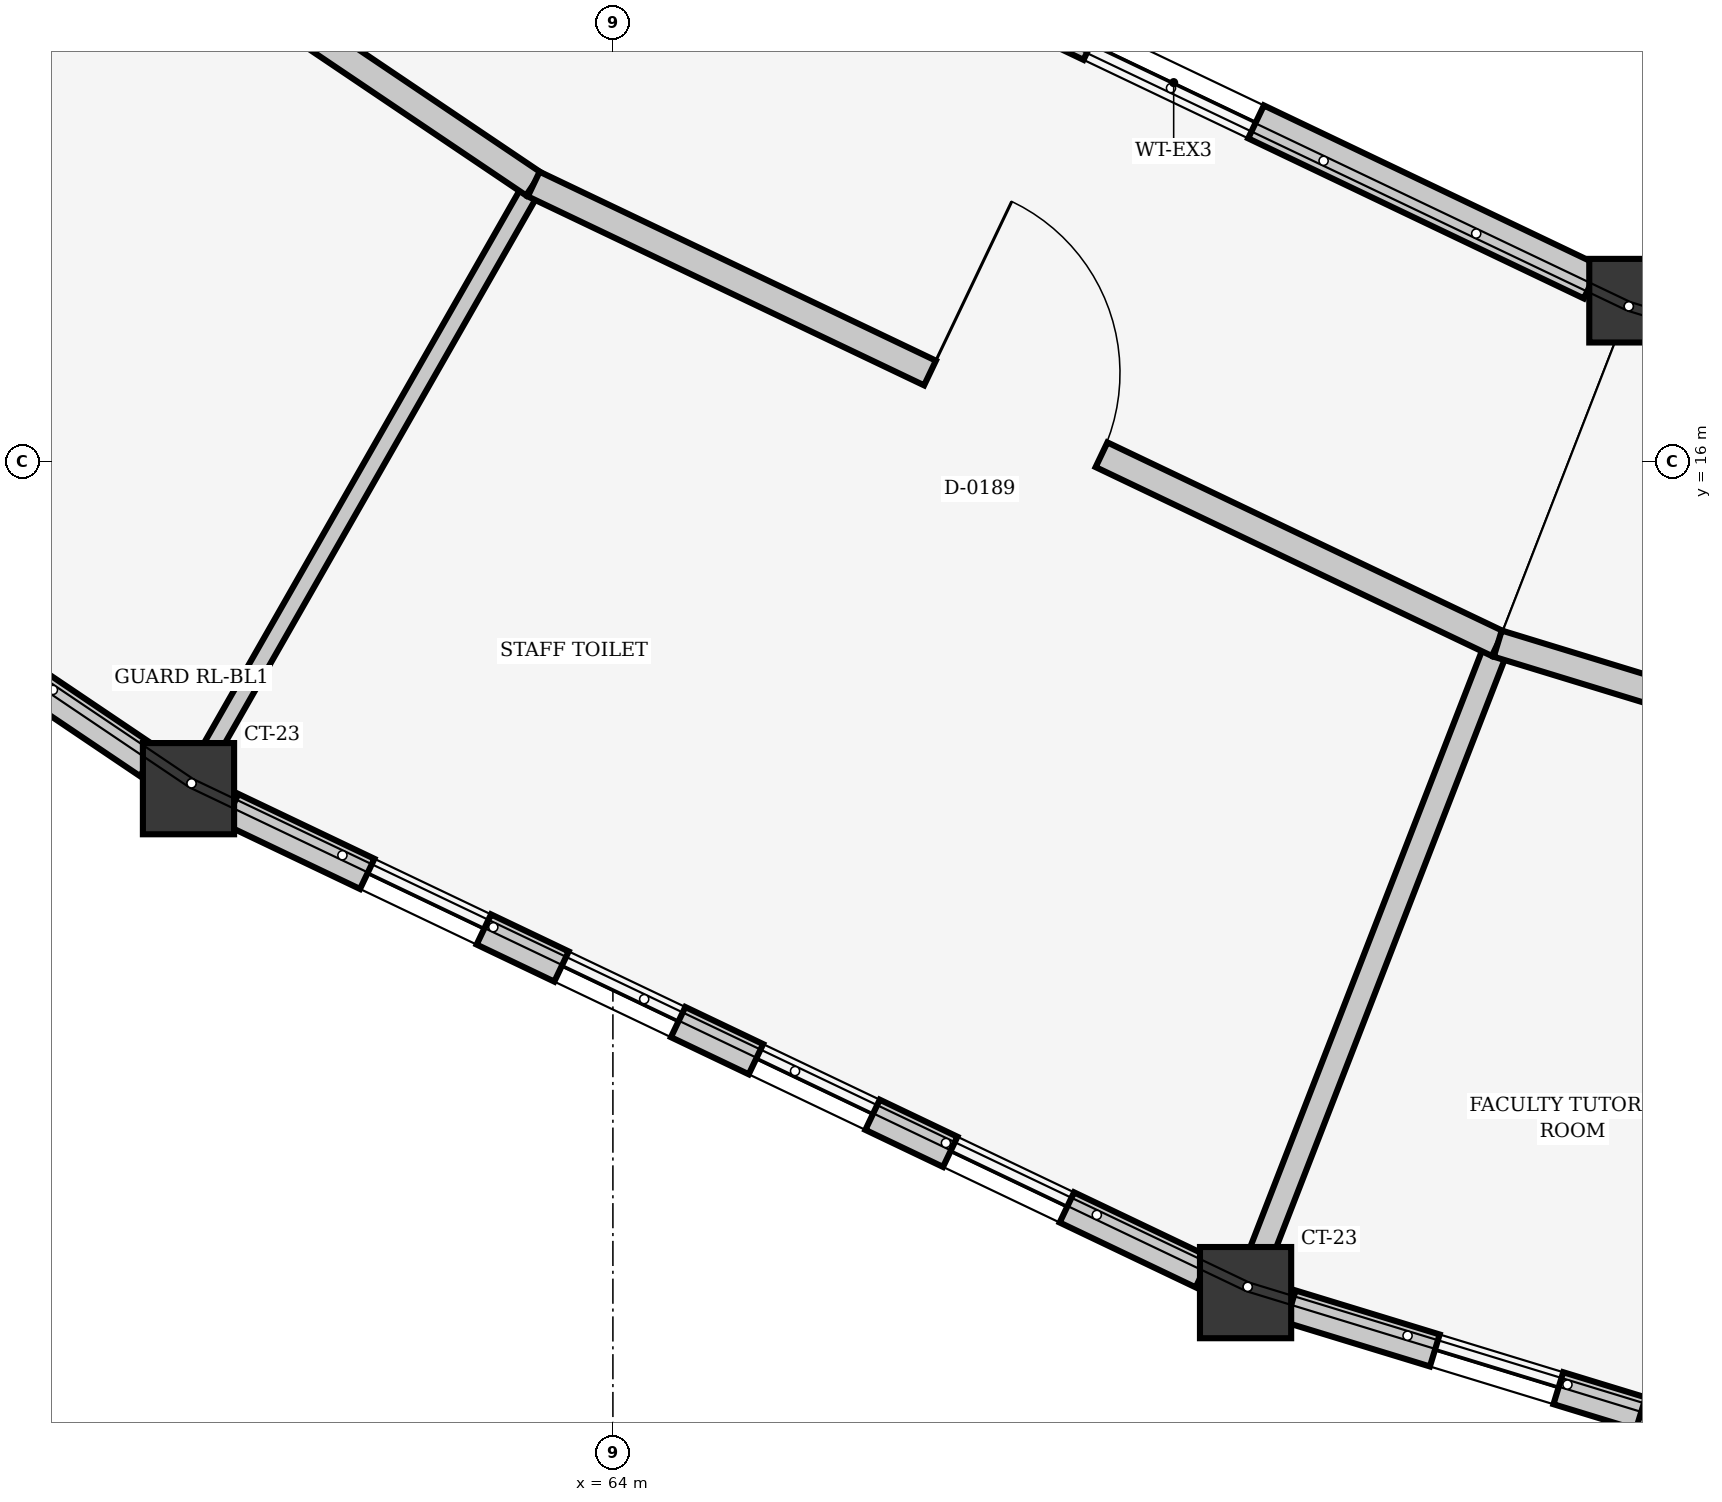
"""IFC4 building model, lengths in metres.
Left out: names, types, materials, properties, quantities, classifications, styles, units other than length and angle.
Written with IfcOpenShell. Run it as: python <this file> out.ifc"""

import sys

from ifc_helpers import new_model, si_unit, direction, frame, frame_2d, origin, origin_2d, place, context, subcontext, project, spatial, rectangle, extrude, element, fill, save


model = new_model("IFC4")
c1 = context("Model", 3, precision=1e-05, world=origin(), true_north=direction((0.0, 1.0)))
c2 = subcontext(c1, "Body", "Model", "MODEL_VIEW")
j1 = project(units=[si_unit("LENGTHUNIT", "METRE"), si_unit("PLANEANGLEUNIT", "RADIAN")], contexts=[c1])
p1 = place(None, origin())
s1 = spatial("IfcSite", under=j1, at=p1, CompositionType="ELEMENT")
p2 = place(p1, origin())
s2 = spatial("IfcBuilding", under=s1, at=p2, CompositionType="ELEMENT")
p3 = place(p2, frame((0.0, 0.0, 8.5)))
s3 = spatial("IfcBuildingStorey", under=s2, at=p3, CompositionType="ELEMENT", Elevation=8.5)
p4 = place(p3, frame((70.698, 17.057, 0.0), z_axis=(0.0, 0.0, 1.0), x_axis=(-0.362275366705, -0.932071112458, 0.0)))
e1 = element("IfcColumn", 1, at=p4, inside=s3, PredefinedType="COLUMN", context=c2, shape_type="SweptSolid", body=[
    extrude(rectangle(XDim=0.55, YDim=0.55, at=origin_2d()), origin(), (0.0, 0.0, 1.0), 4.0),
])
for number, where, z_axis, x_axis in (
    (2, (61.208, 13.847, 0.0), (0.0, 0.0, 1.0), (-0.496, -0.868, 0.0)),
    (3, (68.162, 10.532, 0.0), (0.0, 0.0, 1.0), (-0.362, -0.932, 0.0)),
):
    element("IfcColumn", number, at=place(p3, frame(where, z_axis=z_axis, x_axis=x_axis)), inside=s3, PredefinedType="COLUMN", context=c2, shape_type="SweptSolid", body=[
        extrude(rectangle(XDim=0.6, YDim=0.6, at=origin_2d()), origin(), (0.0, 0.0, 1.0), 4.0),
    ])
p5 = place(p3, frame((60.95, 14.021, 0.0), z_axis=(0.0, 0.0, 1.0), x_axis=(-0.829217797208, 0.558925616512, 0.0)))
e4 = element("IfcWall", 4, at=p5, inside=s3, PredefinedType="SOLIDWALL", context=c2, shape_type="SweptSolid", body=[
    extrude(rectangle(XDim=7.082, YDim=0.22, at=frame_2d((3.541, 0.0))), origin(), (0.0, 0.0, 1.0), 3.192),
])
p6 = place(p5, frame((0.991, 0.0, 0.85)))
e5 = element("IfcOpeningElement", 5, at=p6, cuts=e4, PredefinedType="OPENING", context=c2, shape_type="SweptSolid", body=[
    extrude(rectangle(XDim=0.85, YDim=1.25, at=frame_2d((0.425, 0.625))), frame((0.0, 0.12, 0.0), z_axis=(0.0, -1.0, 0.0), x_axis=(1.0, 0.0, 0.0)), (0.0, 0.0, 1.0), 0.24),
])
p7 = place(p5, frame((2.408, 0.0, 0.85)))
e6 = element("IfcOpeningElement", 6, at=p7, cuts=e4, PredefinedType="OPENING", context=c2, shape_type="SweptSolid", body=[
    extrude(rectangle(XDim=0.85, YDim=1.25, at=frame_2d((0.425, 0.625))), frame((0.0, 0.12, 0.0), z_axis=(0.0, -1.0, 0.0), x_axis=(1.0, 0.0, 0.0)), (0.0, 0.0, 1.0), 0.24),
])
p8 = place(p5, frame((3.824, 0.0, 0.85)))
e7 = element("IfcOpeningElement", 7, at=p8, cuts=e4, PredefinedType="OPENING", context=c2, shape_type="SweptSolid", body=[
    extrude(rectangle(XDim=0.85, YDim=1.25, at=frame_2d((0.425, 0.625))), frame((0.0, 0.12, 0.0), z_axis=(0.0, -1.0, 0.0), x_axis=(1.0, 0.0, 0.0)), (0.0, 0.0, 1.0), 0.24),
])
p9 = place(p5, frame((5.24, 0.0, 0.85)))
e8 = element("IfcOpeningElement", 8, at=p9, cuts=e4, PredefinedType="OPENING", context=c2, shape_type="SweptSolid", body=[
    extrude(rectangle(XDim=0.85, YDim=1.25, at=frame_2d((0.425, 0.625))), frame((0.0, 0.12, 0.0), z_axis=(0.0, -1.0, 0.0), x_axis=(1.0, 0.0, 0.0)), (0.0, 0.0, 1.0), 0.24),
])
p10 = place(p3, frame((67.881, 10.666, 0.0), z_axis=(0.0, 0.0, 1.0), x_axis=(-0.902694754948, 0.430281511792, 0.0)))
e9 = element("IfcWall", 9, at=p10, inside=s3, PredefinedType="SOLIDWALL", context=c2, shape_type="SweptSolid", body=[
    extrude(rectangle(XDim=7.081, YDim=0.22, at=frame_2d((3.541, 0.0))), origin(), (0.0, 0.0, 1.0), 3.192),
])
p11 = place(p10, frame((0.991, 0.0, 0.85)))
e10 = element("IfcOpeningElement", 10, at=p11, cuts=e9, PredefinedType="OPENING", context=c2, shape_type="SweptSolid", body=[
    extrude(rectangle(XDim=0.85, YDim=1.25, at=frame_2d((0.425, 0.625))), frame((0.0, 0.12, 0.0), z_axis=(0.0, -1.0, 0.0), x_axis=(1.0, 0.0, 0.0)), (0.0, 0.0, 1.0), 0.24),
])
p12 = place(p10, frame((2.407, 0.0, 0.85)))
e11 = element("IfcOpeningElement", 11, at=p12, cuts=e9, PredefinedType="OPENING", context=c2, shape_type="SweptSolid", body=[
    extrude(rectangle(XDim=0.85, YDim=1.25, at=frame_2d((0.425, 0.625))), frame((0.0, 0.12, 0.0), z_axis=(0.0, -1.0, 0.0), x_axis=(1.0, 0.0, 0.0)), (0.0, 0.0, 1.0), 0.24),
])
p13 = place(p10, frame((3.824, 0.0, 0.85)))
e12 = element("IfcOpeningElement", 12, at=p13, cuts=e9, PredefinedType="OPENING", context=c2, shape_type="SweptSolid", body=[
    extrude(rectangle(XDim=0.85, YDim=1.25, at=frame_2d((0.425, 0.625))), frame((0.0, 0.12, 0.0), z_axis=(0.0, -1.0, 0.0), x_axis=(1.0, 0.0, 0.0)), (0.0, 0.0, 1.0), 0.24),
])
p14 = place(p10, frame((5.24, 0.0, 0.85)))
e13 = element("IfcOpeningElement", 13, at=p14, cuts=e9, PredefinedType="OPENING", context=c2, shape_type="SweptSolid", body=[
    extrude(rectangle(XDim=0.85, YDim=1.25, at=frame_2d((0.425, 0.625))), frame((0.0, 0.12, 0.0), z_axis=(0.0, -1.0, 0.0), x_axis=(1.0, 0.0, 0.0)), (0.0, 0.0, 1.0), 0.24),
])
p15 = place(p3, frame((64.939, 19.803, 0.0), z_axis=(0.0, 0.0, 1.0), x_axis=(0.90260559719, -0.430468507467, 0.0)))
e14 = element("IfcWall", 14, at=p15, inside=s3, PredefinedType="SOLIDWALL", context=c2, shape_type="SweptSolid", body=[
    extrude(rectangle(XDim=6.094, YDim=0.24, at=frame_2d((3.047, 0.0))), origin(), (0.0, 0.0, 1.0), 3.05),
])
p16 = place(p15, frame((2.447, 0.0, 2.05)))
e15 = element("IfcOpeningElement", 15, at=p16, cuts=e14, PredefinedType="OPENING", context=c2, shape_type="SweptSolid", body=[
    extrude(rectangle(XDim=1.2, YDim=0.85, at=frame_2d((0.6, 0.425))), frame((0.0, 0.13, 0.0), z_axis=(0.0, -1.0, 0.0), x_axis=(1.0, 0.0, 0.0)), (0.0, 0.0, 1.0), 0.26),
])
p17 = place(p3, frame((75.232, 8.372, 0.0), z_axis=(0.0, 0.0, 1.0), x_axis=(-0.956377793717, 0.292132702183, 0.0)))
e16 = element("IfcWall", 16, at=p17, inside=s3, PredefinedType="SOLIDWALL", context=c2, shape_type="SweptSolid", body=[
    extrude(rectangle(XDim=7.082, YDim=0.22, at=frame_2d((3.541, 0.0))), origin(), (0.0, 0.0, 1.0), 3.192),
])
p18 = place(p17, frame((0.991, 0.0, 0.85)))
e17 = element("IfcOpeningElement", 17, at=p18, cuts=e16, PredefinedType="OPENING", context=c2, shape_type="SweptSolid", body=[
    extrude(rectangle(XDim=0.85, YDim=1.25, at=frame_2d((0.425, 0.625))), frame((0.0, 0.12, 0.0), z_axis=(0.0, -1.0, 0.0), x_axis=(1.0, 0.0, 0.0)), (0.0, 0.0, 1.0), 0.24),
])
p19 = place(p17, frame((2.408, 0.0, 0.85)))
e18 = element("IfcOpeningElement", 18, at=p19, cuts=e16, PredefinedType="OPENING", context=c2, shape_type="SweptSolid", body=[
    extrude(rectangle(XDim=0.85, YDim=1.25, at=frame_2d((0.425, 0.625))), frame((0.0, 0.12, 0.0), z_axis=(0.0, -1.0, 0.0), x_axis=(1.0, 0.0, 0.0)), (0.0, 0.0, 1.0), 0.24),
])
p20 = place(p17, frame((3.824, 0.0, 0.85)))
e19 = element("IfcOpeningElement", 19, at=p20, cuts=e16, PredefinedType="OPENING", context=c2, shape_type="SweptSolid", body=[
    extrude(rectangle(XDim=0.85, YDim=1.25, at=frame_2d((0.425, 0.625))), frame((0.0, 0.12, 0.0), z_axis=(0.0, -1.0, 0.0), x_axis=(1.0, 0.0, 0.0)), (0.0, 0.0, 1.0), 0.24),
])
p21 = place(p17, frame((5.241, 0.0, 0.85)))
e20 = element("IfcOpeningElement", 20, at=p21, cuts=e16, PredefinedType="OPENING", context=c2, shape_type="SweptSolid", body=[
    extrude(rectangle(XDim=0.85, YDim=1.25, at=frame_2d((0.425, 0.625))), frame((0.0, 0.12, 0.0), z_axis=(0.0, -1.0, 0.0), x_axis=(1.0, 0.0, 0.0)), (0.0, 0.0, 1.0), 0.24),
])
p22 = place(p3, frame((63.479, 17.824, 0.0), z_axis=(0.0, 0.0, 1.0), x_axis=(-0.495893608829, -0.868383284456, 0.0)))
e21 = element("IfcWall", 21, at=p22, inside=s3, PredefinedType="PARTITIONING", context=c2, shape_type="SweptSolid", body=[
    extrude(rectangle(XDim=4.287, YDim=0.12, at=frame_2d((2.144, 0.0))), origin(), (0.0, 0.0, 1.0), 3.092),
])
p23 = place(p3, frame((69.821, 14.801, 0.0), z_axis=(0.0, 0.0, 1.0), x_axis=(-0.362155011762, -0.932117882811, 0.0)))
e22 = element("IfcWall", 22, at=p23, inside=s3, PredefinedType="PARTITIONING", context=c2, shape_type="SweptSolid", body=[
    extrude(rectangle(XDim=4.288, YDim=0.16, at=frame_2d((2.144, 0.0))), origin(), (0.0, 0.0, 1.0), 3.092),
])
p24 = place(p3, frame((57.654, 21.751, 0.0), z_axis=(0.0, 0.0, 1.0), x_axis=(0.829168029301, -0.558999444709, 0.0)))
e23 = element("IfcWall", 23, at=p24, inside=s3, PredefinedType="PARTITIONING", context=c2, shape_type="SweptSolid", body=[
    extrude(rectangle(XDim=7.025, YDim=0.18, at=frame_2d((3.513, 0.0))), origin(), (0.0, 0.0, 1.0), 3.092),
])
p25 = place(p24, frame((3.023, 0.0, 0.0)))
e24 = element("IfcOpeningElement", 24, at=p25, cuts=e23, PredefinedType="OPENING", context=c2, shape_type="SweptSolid", body=[
    extrude(rectangle(XDim=0.98, YDim=2.2, at=frame_2d((0.49, 1.1))), frame((0.0, 0.1, 0.0), z_axis=(0.0, -1.0, 0.0), x_axis=(1.0, 0.0, 0.0)), (0.0, 0.0, 1.0), 0.2),
])
p26 = place(p3, frame((63.479, 17.824, 0.0), z_axis=(0.0, 0.0, 1.0), x_axis=(0.90269858831, -0.430273469625, 0.0)))
e25 = element("IfcWall", 25, at=p26, inside=s3, PredefinedType="PARTITIONING", context=c2, shape_type="SweptSolid", body=[
    extrude(rectangle(XDim=7.026, YDim=0.18, at=frame_2d((3.513, 0.0))), origin(), (0.0, 0.0, 1.0), 3.092),
])
p27 = place(p26, frame((2.888, 0.0, 0.0)))
e26 = element("IfcOpeningElement", 26, at=p27, cuts=e25, PredefinedType="OPENING", context=c2, shape_type="SweptSolid", body=[
    extrude(rectangle(XDim=1.25, YDim=2.2, at=frame_2d((0.625, 1.1))), frame((0.0, 0.1, 0.0), z_axis=(0.0, -1.0, 0.0), x_axis=(1.0, 0.0, 0.0)), (0.0, 0.0, 1.0), 0.2),
])
p28 = place(p3, frame((69.821, 14.801, 0.0), z_axis=(0.0, 0.0, 1.0), x_axis=(0.956341588058, -0.292251205218, 0.0)))
e27 = element("IfcWall", 27, at=p28, inside=s3, PredefinedType="PARTITIONING", context=c2, shape_type="SweptSolid", body=[
    extrude(rectangle(XDim=7.025, YDim=0.18, at=frame_2d((3.512, 0.0))), origin(), (0.0, 0.0, 1.0), 3.092),
])
p29 = place(p28, frame((2.737, 0.0, 0.0)))
e28 = element("IfcOpeningElement", 28, at=p29, cuts=e27, PredefinedType="OPENING", context=c2, shape_type="SweptSolid", body=[
    extrude(rectangle(XDim=1.55, YDim=2.2, at=frame_2d((0.775, 1.1))), frame((0.0, 0.1, 0.0), z_axis=(0.0, -1.0, 0.0), x_axis=(1.0, 0.0, 0.0)), (0.0, 0.0, 1.0), 0.2),
])
p30 = place(p11, origin())
e29 = element("IfcWindow", 29, at=p30, inside=s3, PartitioningType="SINGLE_PANEL", PredefinedType="WINDOW", context=c2, shape_type="SweptSolid", body=[
    extrude(rectangle(XDim=0.85, YDim=1.25, at=frame_2d((0.425, 0.625))), frame((0.0, 0.03, 0.0), z_axis=(0.0, -1.0, 0.0), x_axis=(1.0, 0.0, 0.0)), (0.0, 0.0, 1.0), 0.06),
])
fill(e10, e29)
p31 = place(p12, origin())
e30 = element("IfcWindow", 30, at=p31, inside=s3, PartitioningType="SINGLE_PANEL", PredefinedType="WINDOW", context=c2, shape_type="SweptSolid", body=[
    extrude(rectangle(XDim=0.85, YDim=1.25, at=frame_2d((0.425, 0.625))), frame((0.0, 0.03, 0.0), z_axis=(0.0, -1.0, 0.0), x_axis=(1.0, 0.0, 0.0)), (0.0, 0.0, 1.0), 0.06),
])
fill(e11, e30)
p32 = place(p13, origin())
e31 = element("IfcWindow", 31, at=p32, inside=s3, PartitioningType="SINGLE_PANEL", PredefinedType="WINDOW", context=c2, shape_type="SweptSolid", body=[
    extrude(rectangle(XDim=0.85, YDim=1.25, at=frame_2d((0.425, 0.625))), frame((0.0, 0.03, 0.0), z_axis=(0.0, -1.0, 0.0), x_axis=(1.0, 0.0, 0.0)), (0.0, 0.0, 1.0), 0.06),
])
fill(e12, e31)
p33 = place(p14, origin())
e32 = element("IfcWindow", 32, at=p33, inside=s3, PartitioningType="SINGLE_PANEL", PredefinedType="WINDOW", context=c2, shape_type="SweptSolid", body=[
    extrude(rectangle(XDim=0.85, YDim=1.25, at=frame_2d((0.425, 0.625))), frame((0.0, 0.03, 0.0), z_axis=(0.0, -1.0, 0.0), x_axis=(1.0, 0.0, 0.0)), (0.0, 0.0, 1.0), 0.06),
])
fill(e13, e32)
p34 = place(p16, origin())
e33 = element("IfcWindow", 33, at=p34, inside=s3, PartitioningType="SINGLE_PANEL", PredefinedType="WINDOW", context=c2, shape_type="SweptSolid", body=[
    extrude(rectangle(XDim=1.2, YDim=0.85, at=frame_2d((0.6, 0.425))), frame((0.0, 0.03, 0.0), z_axis=(0.0, -1.0, 0.0), x_axis=(1.0, 0.0, 0.0)), (0.0, 0.0, 1.0), 0.06),
])
fill(e15, e33)
p35 = place(p20, origin())
e34 = element("IfcWindow", 34, at=p35, inside=s3, PartitioningType="SINGLE_PANEL", PredefinedType="WINDOW", context=c2, shape_type="SweptSolid", body=[
    extrude(rectangle(XDim=0.85, YDim=1.25, at=frame_2d((0.425, 0.625))), frame((0.0, 0.03, 0.0), z_axis=(0.0, -1.0, 0.0), x_axis=(1.0, 0.0, 0.0)), (0.0, 0.0, 1.0), 0.06),
])
fill(e19, e34)
p36 = place(p21, origin())
e35 = element("IfcWindow", 35, at=p36, inside=s3, PartitioningType="SINGLE_PANEL", PredefinedType="WINDOW", context=c2, shape_type="SweptSolid", body=[
    extrude(rectangle(XDim=0.85, YDim=1.25, at=frame_2d((0.425, 0.625))), frame((0.0, 0.03, 0.0), z_axis=(0.0, -1.0, 0.0), x_axis=(1.0, 0.0, 0.0)), (0.0, 0.0, 1.0), 0.06),
])
fill(e20, e35)
p37 = place(p27, origin())
e36 = element("IfcDoor", 36, at=p37, inside=s3, OperationType="SINGLE_SWING_LEFT", PredefinedType="DOOR", context=c2, shape_type="SweptSolid", body=[
    extrude(rectangle(XDim=1.25, YDim=2.2, at=frame_2d((0.625, 1.1))), frame((0.0, 0.025, 0.0), z_axis=(0.0, -1.0, 0.0), x_axis=(1.0, 0.0, 0.0)), (0.0, 0.0, 1.0), 0.05),
])
fill(e26, e36)
save(model, sys.argv[1])
